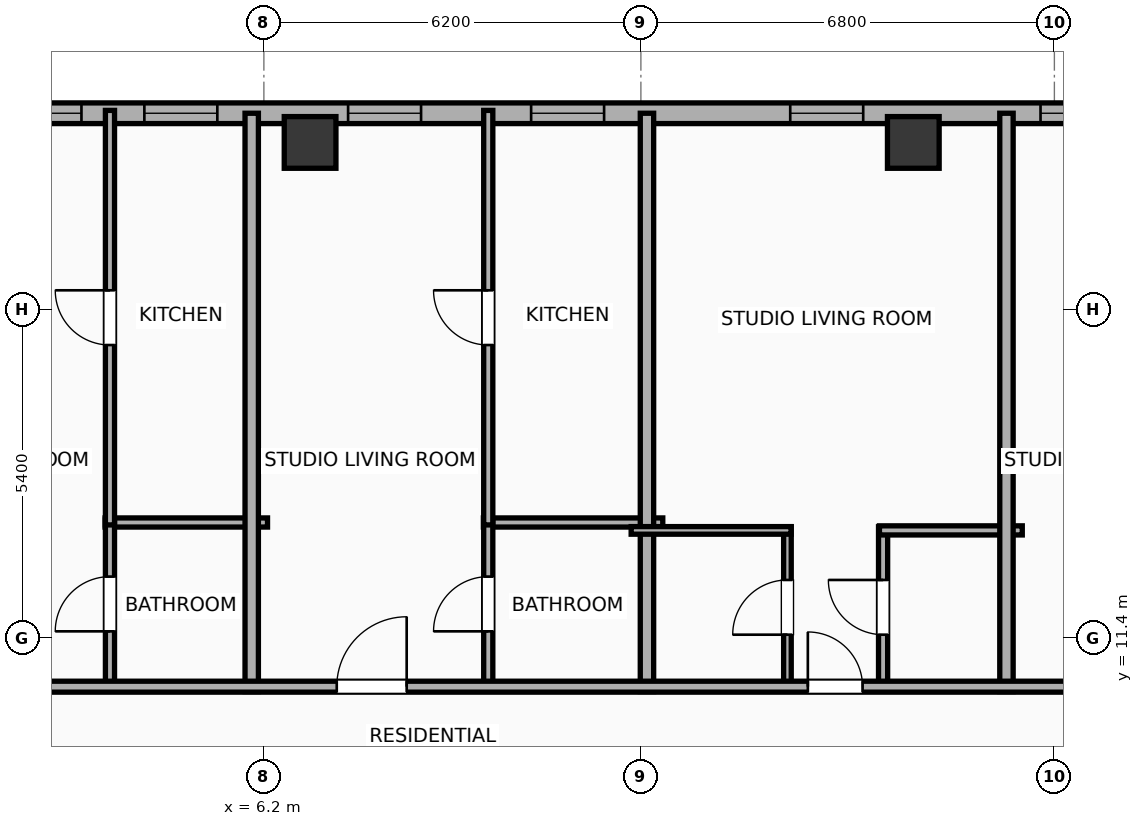
"""IFC4 building model, lengths in metres.
Left out: names, types, materials, properties, quantities, classifications, styles, units other than length and angle.
Written with IfcOpenShell. Run it as: python <this file> out.ifc"""

import sys

from ifc_helpers import new_model, si_unit, direction, frame, frame_2d, origin, origin_2d, place, context, subcontext, project, spatial, rectangle, hollow_rectangle, extrude, element, fill, save


model = new_model("IFC4")
c1 = context("Model", 3, precision=1e-05, world=origin(), true_north=direction((0.0, 1.0)))
c2 = subcontext(c1, "Body", "Model", "MODEL_VIEW")
j1 = project(units=[si_unit("LENGTHUNIT", "METRE"), si_unit("PLANEANGLEUNIT", "RADIAN")], contexts=[c1])
p1 = place(None, origin())
s1 = spatial("IfcSite", under=j1, at=p1, CompositionType="ELEMENT")
p2 = place(p1, origin())
s2 = spatial("IfcBuilding", under=s1, at=p2, CompositionType="ELEMENT")
p3 = place(p2, frame((0.0, 0.0, 247.0)))
s3 = spatial("IfcBuildingStorey", under=s2, at=p3, CompositionType="ELEMENT", Elevation=247.0)
for number, where, z_axis, x_axis in (
    (1, (16.88, 19.55, 0.0), (0.0, 0.0, 1.0), (1.0, 0.0, 0.0)),
    (2, (6.96, 19.55, 0.0), (0.0, 0.0, 1.0), (1.0, 0.0, 0.0)),
):
    element("IfcColumn", number, at=place(p3, frame(where, z_axis=z_axis, x_axis=x_axis)), inside=s3, PredefinedType="COLUMN", context=c2, shape_type="SweptSolid", body=[
        extrude(hollow_rectangle(XDim=0.85, YDim=0.85, WallThickness=0.028, at=origin_2d()), origin(), (0.0, 0.0, 1.0), 3.9),
    ])
p4 = place(p3, frame((-22.783, 20.03, 0.0), z_axis=(0.0, 0.0, 1.0), x_axis=(1.0, 0.0, 0.0)))
e3 = element("IfcWall", 3, at=p4, inside=s3, PredefinedType="ELEMENTEDWALL", context=c2, shape_type="SweptSolid", body=[
    extrude(rectangle(XDim=49.566, YDim=0.34, at=frame_2d((24.783, 0.0))), origin(), (0.0, 0.0, 1.0), 3.65),
])
p5 = place(p4, frame((6.211, 0.0, 0.75)))
e4 = element("IfcOpeningElement", 4, at=p5, cuts=e3, PredefinedType="OPENING", context=c2, shape_type="SweptSolid", body=[
    extrude(rectangle(XDim=2.4, YDim=2.1, at=frame_2d((1.2, 1.05))), frame((0.0, 0.18, 0.0), z_axis=(0.0, -1.0, 0.0), x_axis=(1.0, 0.0, 0.0)), (0.0, 0.0, 1.0), 0.36),
])
p6 = place(p4, frame((23.583, 0.0, 0.75)))
e5 = element("IfcOpeningElement", 5, at=p6, cuts=e3, PredefinedType="OPENING", context=c2, shape_type="SweptSolid", body=[
    extrude(rectangle(XDim=2.4, YDim=2.1, at=frame_2d((1.2, 1.05))), frame((0.0, 0.18, 0.0), z_axis=(0.0, -1.0, 0.0), x_axis=(1.0, 0.0, 0.0)), (0.0, 0.0, 1.0), 0.36),
])
p7 = place(p4, frame((41.756, 0.0, 0.75)))
e6 = element("IfcOpeningElement", 6, at=p7, cuts=e3, PredefinedType="OPENING", context=c2, shape_type="SweptSolid", body=[
    extrude(rectangle(XDim=2.4, YDim=2.1, at=frame_2d((1.2, 1.05))), frame((0.0, 0.18, 0.0), z_axis=(0.0, -1.0, 0.0), x_axis=(1.0, 0.0, 0.0)), (0.0, 0.0, 1.0), 0.36),
])
p8 = place(p4, frame((3.511, 0.0, 0.75)))
e7 = element("IfcOpeningElement", 7, at=p8, cuts=e3, PredefinedType="OPENING", context=c2, shape_type="SweptSolid", body=[
    extrude(rectangle(XDim=1.2, YDim=2.05, at=frame_2d((0.6, 1.025))), frame((0.0, 0.18, 0.0), z_axis=(0.0, -1.0, 0.0), x_axis=(1.0, 0.0, 0.0)), (0.0, 0.0, 1.0), 0.36),
])
p9 = place(p4, frame((11.933, 0.0, 0.75)))
e8 = element("IfcOpeningElement", 8, at=p9, cuts=e3, PredefinedType="OPENING", context=c2, shape_type="SweptSolid", body=[
    extrude(rectangle(XDim=1.2, YDim=2.05, at=frame_2d((0.6, 1.025))), frame((0.0, 0.18, 0.0), z_axis=(0.0, -1.0, 0.0), x_axis=(1.0, 0.0, 0.0)), (0.0, 0.0, 1.0), 0.36),
])
p10 = place(p4, frame((17.953, 0.0, 0.75)))
e9 = element("IfcOpeningElement", 9, at=p10, cuts=e3, PredefinedType="OPENING", context=c2, shape_type="SweptSolid", body=[
    extrude(rectangle(XDim=1.2, YDim=2.05, at=frame_2d((0.6, 1.025))), frame((0.0, 0.18, 0.0), z_axis=(0.0, -1.0, 0.0), x_axis=(1.0, 0.0, 0.0)), (0.0, 0.0, 1.0), 0.36),
])
p11 = place(p4, frame((27.018, 0.0, 0.75)))
e10 = element("IfcOpeningElement", 10, at=p11, cuts=e3, PredefinedType="OPENING", context=c2, shape_type="SweptSolid", body=[
    extrude(rectangle(XDim=1.2, YDim=2.05, at=frame_2d((0.6, 1.025))), frame((0.0, 0.18, 0.0), z_axis=(0.0, -1.0, 0.0), x_axis=(1.0, 0.0, 0.0)), (0.0, 0.0, 1.0), 0.36),
])
p12 = place(p4, frame((30.368, 0.0, 0.75)))
e11 = element("IfcOpeningElement", 11, at=p12, cuts=e3, PredefinedType="OPENING", context=c2, shape_type="SweptSolid", body=[
    extrude(rectangle(XDim=1.2, YDim=2.05, at=frame_2d((0.6, 1.025))), frame((0.0, 0.18, 0.0), z_axis=(0.0, -1.0, 0.0), x_axis=(1.0, 0.0, 0.0)), (0.0, 0.0, 1.0), 0.36),
])
p13 = place(p4, frame((33.378, 0.0, 0.75)))
e12 = element("IfcOpeningElement", 12, at=p13, cuts=e3, PredefinedType="OPENING", context=c2, shape_type="SweptSolid", body=[
    extrude(rectangle(XDim=1.2, YDim=2.05, at=frame_2d((0.6, 1.025))), frame((0.0, 0.18, 0.0), z_axis=(0.0, -1.0, 0.0), x_axis=(1.0, 0.0, 0.0)), (0.0, 0.0, 1.0), 0.36),
])
p14 = place(p4, frame((37.639, 0.0, 0.75)))
e13 = element("IfcOpeningElement", 13, at=p14, cuts=e3, PredefinedType="OPENING", context=c2, shape_type="SweptSolid", body=[
    extrude(rectangle(XDim=1.2, YDim=2.05, at=frame_2d((0.6, 1.025))), frame((0.0, 0.18, 0.0), z_axis=(0.0, -1.0, 0.0), x_axis=(1.0, 0.0, 0.0)), (0.0, 0.0, 1.0), 0.36),
])
p15 = place(p4, frame((45.25, 0.0, 0.75)))
e14 = element("IfcOpeningElement", 14, at=p15, cuts=e3, PredefinedType="OPENING", context=c2, shape_type="SweptSolid", body=[
    extrude(rectangle(XDim=1.2, YDim=2.05, at=frame_2d((0.6, 1.025))), frame((0.0, 0.18, 0.0), z_axis=(0.0, -1.0, 0.0), x_axis=(1.0, 0.0, 0.0)), (0.0, 0.0, 1.0), 0.36),
])
p16 = place(p4, frame((47.292, 0.0, 0.75)))
e15 = element("IfcOpeningElement", 15, at=p16, cuts=e3, PredefinedType="OPENING", context=c2, shape_type="SweptSolid", body=[
    extrude(rectangle(XDim=1.2, YDim=2.05, at=frame_2d((0.6, 1.025))), frame((0.0, 0.18, 0.0), z_axis=(0.0, -1.0, 0.0), x_axis=(1.0, 0.0, 0.0)), (0.0, 0.0, 1.0), 0.36),
])
p17 = place(p3, frame((3.589, 13.3, 0.0), z_axis=(0.0, 0.0, 1.0), x_axis=(1.0, 0.0, 0.0)))
e16 = element("IfcWall", 16, at=p17, inside=s3, PredefinedType="PLUMBINGWALL", context=c2, shape_type="SweptSolid", body=[
    extrude(rectangle(XDim=2.671, YDim=0.15, at=frame_2d((1.335, 0.0))), origin(), (0.0, 0.0, 1.0), 3.65),
])
p18 = place(p3, frame((3.669, 10.58, 0.0), z_axis=(0.0, 0.0, 1.0), x_axis=(0.0, 1.0, 0.0)))
e17 = element("IfcWall", 17, at=p18, inside=s3, PredefinedType="PLUMBINGWALL", context=c2, shape_type="SweptSolid", body=[
    extrude(rectangle(XDim=2.76, YDim=0.15, at=frame_2d((1.38, 0.0))), origin(), (0.0, 0.0, 1.0), 3.65),
])
p19 = place(p18, frame((0.93, 0.0, 0.0)))
e18 = element("IfcOpeningElement", 18, at=p19, cuts=e17, PredefinedType="OPENING", context=c2, shape_type="SweptSolid", body=[
    extrude(rectangle(XDim=0.9, YDim=2.05, at=frame_2d((0.45, 1.025))), frame((0.0, 0.085, 0.0), z_axis=(0.0, -1.0, 0.0), x_axis=(1.0, 0.0, 0.0)), (0.0, 0.0, 1.0), 0.17),
])
p20 = place(p3, frame((3.669, 13.26, 0.0), z_axis=(0.0, 0.0, 1.0), x_axis=(0.0, 1.0, 0.0)))
e19 = element("IfcWall", 19, at=p20, inside=s3, PredefinedType="PLUMBINGWALL", context=c2, shape_type="SweptSolid", body=[
    extrude(rectangle(XDim=6.817, YDim=0.15, at=frame_2d((3.408, 0.0))), origin(), (0.0, 0.0, 1.0), 3.65),
])
p21 = place(p20, frame((2.958, 0.0, 0.0)))
e20 = element("IfcOpeningElement", 20, at=p21, cuts=e19, PredefinedType="OPENING", context=c2, shape_type="SweptSolid", body=[
    extrude(rectangle(XDim=0.9, YDim=2.05, at=frame_2d((0.45, 1.025))), frame((0.0, 0.085, 0.0), z_axis=(0.0, -1.0, 0.0), x_axis=(1.0, 0.0, 0.0)), (0.0, 0.0, 1.0), 0.17),
])
p22 = place(p3, frame((6.0, 10.52, 0.0), z_axis=(0.0, 0.0, 1.0), x_axis=(0.0, 1.0, 0.0)))
e21 = element("IfcWall", 21, at=p22, inside=s3, PredefinedType="PARTITIONING", context=c2, shape_type="SweptSolid", body=[
    extrude(rectangle(XDim=9.51, YDim=0.22, at=frame_2d((4.755, 0.0))), origin(), (0.0, 0.0, 1.0), 3.09),
])
p23 = place(p3, frame((9.81, 13.3, 0.0), z_axis=(0.0, 0.0, 1.0), x_axis=(1.0, 0.0, 0.0)))
e22 = element("IfcWall", 22, at=p23, inside=s3, PredefinedType="PLUMBINGWALL", context=c2, shape_type="SweptSolid", body=[
    extrude(rectangle(XDim=2.95, YDim=0.15, at=frame_2d((1.475, 0.0))), origin(), (0.0, 0.0, 1.0), 3.65),
])
p24 = place(p3, frame((9.89, 10.58, 0.0), z_axis=(0.0, 0.0, 1.0), x_axis=(0.0, 1.0, 0.0)))
e23 = element("IfcWall", 23, at=p24, inside=s3, PredefinedType="PLUMBINGWALL", context=c2, shape_type="SweptSolid", body=[
    extrude(rectangle(XDim=2.76, YDim=0.15, at=frame_2d((1.38, 0.0))), origin(), (0.0, 0.0, 1.0), 3.65),
])
p25 = place(p24, frame((0.93, 0.0, 0.0)))
e24 = element("IfcOpeningElement", 24, at=p25, cuts=e23, PredefinedType="OPENING", context=c2, shape_type="SweptSolid", body=[
    extrude(rectangle(XDim=0.9, YDim=2.05, at=frame_2d((0.45, 1.025))), frame((0.0, 0.085, 0.0), z_axis=(0.0, -1.0, 0.0), x_axis=(1.0, 0.0, 0.0)), (0.0, 0.0, 1.0), 0.17),
])
p26 = place(p3, frame((9.89, 13.26, 0.0), z_axis=(0.0, 0.0, 1.0), x_axis=(0.0, 1.0, 0.0)))
e25 = element("IfcWall", 25, at=p26, inside=s3, PredefinedType="PLUMBINGWALL", context=c2, shape_type="SweptSolid", body=[
    extrude(rectangle(XDim=6.817, YDim=0.15, at=frame_2d((3.408, 0.0))), origin(), (0.0, 0.0, 1.0), 3.65),
])
p27 = place(p26, frame((2.958, 0.0, 0.0)))
e26 = element("IfcOpeningElement", 26, at=p27, cuts=e25, PredefinedType="OPENING", context=c2, shape_type="SweptSolid", body=[
    extrude(rectangle(XDim=0.9, YDim=2.05, at=frame_2d((0.45, 1.025))), frame((0.0, 0.085, 0.0), z_axis=(0.0, -1.0, 0.0), x_axis=(1.0, 0.0, 0.0)), (0.0, 0.0, 1.0), 0.17),
])
p28 = place(p3, frame((12.5, 10.52, 0.0), z_axis=(0.0, 0.0, 1.0), x_axis=(0.0, 1.0, 0.0)))
e27 = element("IfcWall", 27, at=p28, inside=s3, PredefinedType="PARTITIONING", context=c2, shape_type="SweptSolid", body=[
    extrude(rectangle(XDim=9.51, YDim=0.22, at=frame_2d((4.755, 0.0))), origin(), (0.0, 0.0, 1.0), 3.65),
])
p29 = place(p3, frame((14.81, 10.58, 0.0), z_axis=(0.0, 0.0, 1.0), x_axis=(0.0, 1.0, 0.0)))
e28 = element("IfcWall", 28, at=p29, inside=s3, PredefinedType="PARTITIONING", context=c2, shape_type="SweptSolid", body=[
    extrude(rectangle(XDim=2.65, YDim=0.125, at=frame_2d((1.325, 0.0))), origin(), (0.0, 0.0, 1.0), 3.65),
])
p30 = place(p29, frame((0.875, 0.0, 0.0)))
e29 = element("IfcOpeningElement", 29, at=p30, cuts=e28, PredefinedType="OPENING", context=c2, shape_type="SweptSolid", body=[
    extrude(rectangle(XDim=0.9, YDim=2.05, at=frame_2d((0.45, 1.025))), frame((0.0, 0.073, 0.0), z_axis=(0.0, -1.0, 0.0), x_axis=(1.0, 0.0, 0.0)), (0.0, 0.0, 1.0), 0.145),
])
p31 = place(p3, frame((16.383, 10.58, 0.0), z_axis=(0.0, 0.0, 1.0), x_axis=(0.0, 1.0, 0.0)))
e30 = element("IfcWall", 30, at=p31, inside=s3, PredefinedType="PLUMBINGWALL", context=c2, shape_type="SweptSolid", body=[
    extrude(rectangle(XDim=2.65, YDim=0.15, at=frame_2d((1.325, 0.0))), origin(), (0.0, 0.0, 1.0), 3.09),
])
p32 = place(p31, frame((0.875, 0.0, 0.0)))
e31 = element("IfcOpeningElement", 31, at=p32, cuts=e30, PredefinedType="OPENING", context=c2, shape_type="SweptSolid", body=[
    extrude(rectangle(XDim=0.9, YDim=2.05, at=frame_2d((0.45, 1.025))), frame((0.0, 0.085, 0.0), z_axis=(0.0, -1.0, 0.0), x_axis=(1.0, 0.0, 0.0)), (0.0, 0.0, 1.0), 0.17),
])
p33 = place(p3, frame((12.24, 13.17, 0.0), z_axis=(0.0, 0.0, 1.0), x_axis=(1.0, 0.0, 0.0)))
e32 = element("IfcWall", 32, at=p33, inside=s3, PredefinedType="PARTITIONING", context=c2, shape_type="SweptSolid", body=[
    extrude(rectangle(XDim=2.63, YDim=0.125, at=frame_2d((1.315, 0.0))), origin(), (0.0, 0.0, 1.0), 3.65),
])
p34 = place(p3, frame((16.323, 13.17, 0.0), z_axis=(0.0, 0.0, 1.0), x_axis=(1.0, 0.0, 0.0)))
e33 = element("IfcWall", 33, at=p34, inside=s3, PredefinedType="PLUMBINGWALL", context=c2, shape_type="SweptSolid", body=[
    extrude(rectangle(XDim=2.349, YDim=0.15, at=frame_2d((1.175, 0.0))), origin(), (0.0, 0.0, 1.0), 3.65),
])
p35 = place(p3, frame((18.412, 10.52, 0.0), z_axis=(0.0, 0.0, 1.0), x_axis=(0.0, 1.0, 0.0)))
e34 = element("IfcWall", 34, at=p35, inside=s3, PredefinedType="PARTITIONING", context=c2, shape_type="SweptSolid", body=[
    extrude(rectangle(XDim=9.51, YDim=0.22, at=frame_2d((4.755, 0.0))), origin(), (0.0, 0.0, 1.0), 3.65),
])
p36 = place(p3, frame((-26.23, 10.6, 0.0), z_axis=(0.0, 0.0, 1.0), x_axis=(1.0, 0.0, 0.0)))
e35 = element("IfcWall", 35, at=p36, inside=s3, PredefinedType="PARTITIONING", context=c2, shape_type="SweptSolid", body=[
    extrude(rectangle(XDim=56.46, YDim=0.18, at=frame_2d((28.23, 0.0))), origin(), (0.0, 0.0, 1.0), 3.65),
])
p37 = place(p36, frame((2.825, 0.0, 0.0)))
e36 = element("IfcOpeningElement", 36, at=p37, cuts=e35, PredefinedType="OPENING", context=c2, shape_type="SweptSolid", body=[
    extrude(rectangle(XDim=0.9, YDim=2.05, at=frame_2d((0.45, 1.025))), frame((0.0, 0.1, 0.0), z_axis=(0.0, -1.0, 0.0), x_axis=(1.0, 0.0, 0.0)), (0.0, 0.0, 1.0), 0.2),
])
p38 = place(p36, frame((10.135, 0.0, 0.0)))
e37 = element("IfcOpeningElement", 37, at=p38, cuts=e35, PredefinedType="OPENING", context=c2, shape_type="SweptSolid", body=[
    extrude(rectangle(XDim=1.15, YDim=2.05, at=frame_2d((0.575, 1.025))), frame((0.0, 0.1, 0.0), z_axis=(0.0, -1.0, 0.0), x_axis=(1.0, 0.0, 0.0)), (0.0, 0.0, 1.0), 0.2),
])
p39 = place(p36, frame((15.658, 0.0, 0.0)))
e38 = element("IfcOpeningElement", 38, at=p39, cuts=e35, PredefinedType="OPENING", context=c2, shape_type="SweptSolid", body=[
    extrude(rectangle(XDim=0.9, YDim=2.05, at=frame_2d((0.45, 1.025))), frame((0.0, 0.1, 0.0), z_axis=(0.0, -1.0, 0.0), x_axis=(1.0, 0.0, 0.0)), (0.0, 0.0, 1.0), 0.2),
])
p40 = place(p36, frame((22.156, 0.0, 0.0)))
e39 = element("IfcOpeningElement", 39, at=p40, cuts=e35, PredefinedType="OPENING", context=c2, shape_type="SweptSolid", body=[
    extrude(rectangle(XDim=0.9, YDim=2.05, at=frame_2d((0.45, 1.025))), frame((0.0, 0.1, 0.0), z_axis=(0.0, -1.0, 0.0), x_axis=(1.0, 0.0, 0.0)), (0.0, 0.0, 1.0), 0.2),
])
p41 = place(p36, frame((27.271, 0.0, 0.0)))
e40 = element("IfcOpeningElement", 40, at=p41, cuts=e35, PredefinedType="OPENING", context=c2, shape_type="SweptSolid", body=[
    extrude(rectangle(XDim=1.15, YDim=2.05, at=frame_2d((0.575, 1.025))), frame((0.0, 0.1, 0.0), z_axis=(0.0, -1.0, 0.0), x_axis=(1.0, 0.0, 0.0)), (0.0, 0.0, 1.0), 0.2),
])
p42 = place(p36, frame((33.628, 0.0, 0.0)))
e41 = element("IfcOpeningElement", 41, at=p42, cuts=e35, PredefinedType="OPENING", context=c2, shape_type="SweptSolid", body=[
    extrude(rectangle(XDim=1.15, YDim=2.05, at=frame_2d((0.575, 1.025))), frame((0.0, 0.1, 0.0), z_axis=(0.0, -1.0, 0.0), x_axis=(1.0, 0.0, 0.0)), (0.0, 0.0, 1.0), 0.2),
])
p43 = place(p36, frame((41.375, 0.0, 0.0)))
e42 = element("IfcOpeningElement", 42, at=p43, cuts=e35, PredefinedType="OPENING", context=c2, shape_type="SweptSolid", body=[
    extrude(rectangle(XDim=0.9, YDim=2.05, at=frame_2d((0.45, 1.025))), frame((0.0, 0.1, 0.0), z_axis=(0.0, -1.0, 0.0), x_axis=(1.0, 0.0, 0.0)), (0.0, 0.0, 1.0), 0.2),
])
p44 = place(p36, frame((45.796, 0.0, 0.0)))
e43 = element("IfcOpeningElement", 43, at=p44, cuts=e35, PredefinedType="OPENING", context=c2, shape_type="SweptSolid", body=[
    extrude(rectangle(XDim=1.15, YDim=2.05, at=frame_2d((0.575, 1.025))), frame((0.0, 0.1, 0.0), z_axis=(0.0, -1.0, 0.0), x_axis=(1.0, 0.0, 0.0)), (0.0, 0.0, 1.0), 0.2),
])
p45 = place(p36, frame((53.221, 0.0, 0.0)))
e44 = element("IfcOpeningElement", 44, at=p45, cuts=e35, PredefinedType="OPENING", context=c2, shape_type="SweptSolid", body=[
    extrude(rectangle(XDim=0.9, YDim=2.05, at=frame_2d((0.45, 1.025))), frame((0.0, 0.1, 0.0), z_axis=(0.0, -1.0, 0.0), x_axis=(1.0, 0.0, 0.0)), (0.0, 0.0, 1.0), 0.2),
])
p46 = place(p6, origin())
e45 = element("IfcWindow", 45, at=p46, inside=s3, PartitioningType="SINGLE_PANEL", PredefinedType="WINDOW", context=c2, shape_type="SweptSolid", body=[
    extrude(rectangle(XDim=2.4, YDim=2.1, at=frame_2d((1.2, 1.05))), frame((0.0, 0.03, 0.0), z_axis=(0.0, -1.0, 0.0), x_axis=(1.0, 0.0, 0.0)), (0.0, 0.0, 1.0), 0.06),
])
fill(e5, e45)
p47 = place(p7, origin())
e46 = element("IfcWindow", 46, at=p47, inside=s3, PartitioningType="SINGLE_PANEL", PredefinedType="WINDOW", context=c2, shape_type="SweptSolid", body=[
    extrude(rectangle(XDim=2.4, YDim=2.1, at=frame_2d((1.2, 1.05))), frame((0.0, 0.03, 0.0), z_axis=(0.0, -1.0, 0.0), x_axis=(1.0, 0.0, 0.0)), (0.0, 0.0, 1.0), 0.06),
])
fill(e6, e46)
p48 = place(p11, origin())
e47 = element("IfcWindow", 47, at=p48, inside=s3, PartitioningType="SINGLE_PANEL", PredefinedType="WINDOW", context=c2, shape_type="SweptSolid", body=[
    extrude(rectangle(XDim=1.2, YDim=2.05, at=frame_2d((0.6, 1.025))), frame((0.0, 0.03, 0.0), z_axis=(0.0, -1.0, 0.0), x_axis=(1.0, 0.0, 0.0)), (0.0, 0.0, 1.0), 0.06),
])
fill(e10, e47)
p49 = place(p12, origin())
e48 = element("IfcWindow", 48, at=p49, inside=s3, PartitioningType="SINGLE_PANEL", PredefinedType="WINDOW", context=c2, shape_type="SweptSolid", body=[
    extrude(rectangle(XDim=1.2, YDim=2.05, at=frame_2d((0.6, 1.025))), frame((0.0, 0.03, 0.0), z_axis=(0.0, -1.0, 0.0), x_axis=(1.0, 0.0, 0.0)), (0.0, 0.0, 1.0), 0.06),
])
fill(e11, e48)
p50 = place(p13, origin())
e49 = element("IfcWindow", 49, at=p50, inside=s3, PartitioningType="SINGLE_PANEL", PredefinedType="WINDOW", context=c2, shape_type="SweptSolid", body=[
    extrude(rectangle(XDim=1.2, YDim=2.05, at=frame_2d((0.6, 1.025))), frame((0.0, 0.03, 0.0), z_axis=(0.0, -1.0, 0.0), x_axis=(1.0, 0.0, 0.0)), (0.0, 0.0, 1.0), 0.06),
])
fill(e12, e49)
p51 = place(p14, origin())
e50 = element("IfcWindow", 50, at=p51, inside=s3, PartitioningType="SINGLE_PANEL", PredefinedType="WINDOW", context=c2, shape_type="SweptSolid", body=[
    extrude(rectangle(XDim=1.2, YDim=2.05, at=frame_2d((0.6, 1.025))), frame((0.0, 0.03, 0.0), z_axis=(0.0, -1.0, 0.0), x_axis=(1.0, 0.0, 0.0)), (0.0, 0.0, 1.0), 0.06),
])
fill(e13, e50)
p52 = place(p19, origin())
e51 = element("IfcDoor", 51, at=p52, inside=s3, OperationType="SINGLE_SWING_LEFT", PredefinedType="DOOR", context=c2, shape_type="SweptSolid", body=[
    extrude(rectangle(XDim=0.9, YDim=2.05, at=frame_2d((0.45, 1.025))), frame((0.0, 0.025, 0.0), z_axis=(0.0, -1.0, 0.0), x_axis=(1.0, 0.0, 0.0)), (0.0, 0.0, 1.0), 0.05),
])
fill(e18, e51)
p53 = place(p21, origin())
e52 = element("IfcDoor", 52, at=p53, inside=s3, OperationType="SINGLE_SWING_RIGHT", PredefinedType="DOOR", context=c2, shape_type="SweptSolid", body=[
    extrude(rectangle(XDim=0.9, YDim=2.05, at=frame_2d((0.45, 1.025))), frame((0.0, 0.025, 0.0), z_axis=(0.0, -1.0, 0.0), x_axis=(1.0, 0.0, 0.0)), (0.0, 0.0, 1.0), 0.05),
])
fill(e20, e52)
p54 = place(p25, origin())
e53 = element("IfcDoor", 53, at=p54, inside=s3, OperationType="SINGLE_SWING_LEFT", PredefinedType="DOOR", context=c2, shape_type="SweptSolid", body=[
    extrude(rectangle(XDim=0.9, YDim=2.05, at=frame_2d((0.45, 1.025))), frame((0.0, 0.025, 0.0), z_axis=(0.0, -1.0, 0.0), x_axis=(1.0, 0.0, 0.0)), (0.0, 0.0, 1.0), 0.05),
])
fill(e24, e53)
p55 = place(p27, origin())
e54 = element("IfcDoor", 54, at=p55, inside=s3, OperationType="SINGLE_SWING_RIGHT", PredefinedType="DOOR", context=c2, shape_type="SweptSolid", body=[
    extrude(rectangle(XDim=0.9, YDim=2.05, at=frame_2d((0.45, 1.025))), frame((0.0, 0.025, 0.0), z_axis=(0.0, -1.0, 0.0), x_axis=(1.0, 0.0, 0.0)), (0.0, 0.0, 1.0), 0.05),
])
fill(e26, e54)
p56 = place(p30, origin())
e55 = element("IfcDoor", 55, at=p56, inside=s3, OperationType="SINGLE_SWING_LEFT", PredefinedType="DOOR", context=c2, shape_type="SweptSolid", body=[
    extrude(rectangle(XDim=0.9, YDim=2.05, at=frame_2d((0.45, 1.025))), frame((0.0, 0.025, 0.0), z_axis=(0.0, -1.0, 0.0), x_axis=(1.0, 0.0, 0.0)), (0.0, 0.0, 1.0), 0.05),
])
fill(e29, e55)
p57 = place(p32, origin())
e56 = element("IfcDoor", 56, at=p57, inside=s3, OperationType="SINGLE_SWING_RIGHT", PredefinedType="DOOR", context=c2, shape_type="SweptSolid", body=[
    extrude(rectangle(XDim=0.9, YDim=2.05, at=frame_2d((0.45, 1.025))), frame((0.0, 0.025, 0.0), z_axis=(0.0, -1.0, 0.0), x_axis=(1.0, 0.0, 0.0)), (0.0, 0.0, 1.0), 0.05),
])
fill(e31, e56)
p58 = place(p42, origin())
e57 = element("IfcDoor", 57, at=p58, inside=s3, OperationType="SINGLE_SWING_RIGHT", PredefinedType="DOOR", context=c2, shape_type="SweptSolid", body=[
    extrude(rectangle(XDim=1.15, YDim=2.05, at=frame_2d((0.575, 1.025))), frame((0.0, 0.025, 0.0), z_axis=(0.0, -1.0, 0.0), x_axis=(1.0, 0.0, 0.0)), (0.0, 0.0, 1.0), 0.05),
])
fill(e41, e57)
p59 = place(p43, origin())
e58 = element("IfcDoor", 58, at=p59, inside=s3, OperationType="SINGLE_SWING_LEFT", PredefinedType="DOOR", context=c2, shape_type="SweptSolid", body=[
    extrude(rectangle(XDim=0.9, YDim=2.05, at=frame_2d((0.45, 1.025))), frame((0.0, 0.025, 0.0), z_axis=(0.0, -1.0, 0.0), x_axis=(1.0, 0.0, 0.0)), (0.0, 0.0, 1.0), 0.05),
])
fill(e42, e58)
save(model, sys.argv[1])
